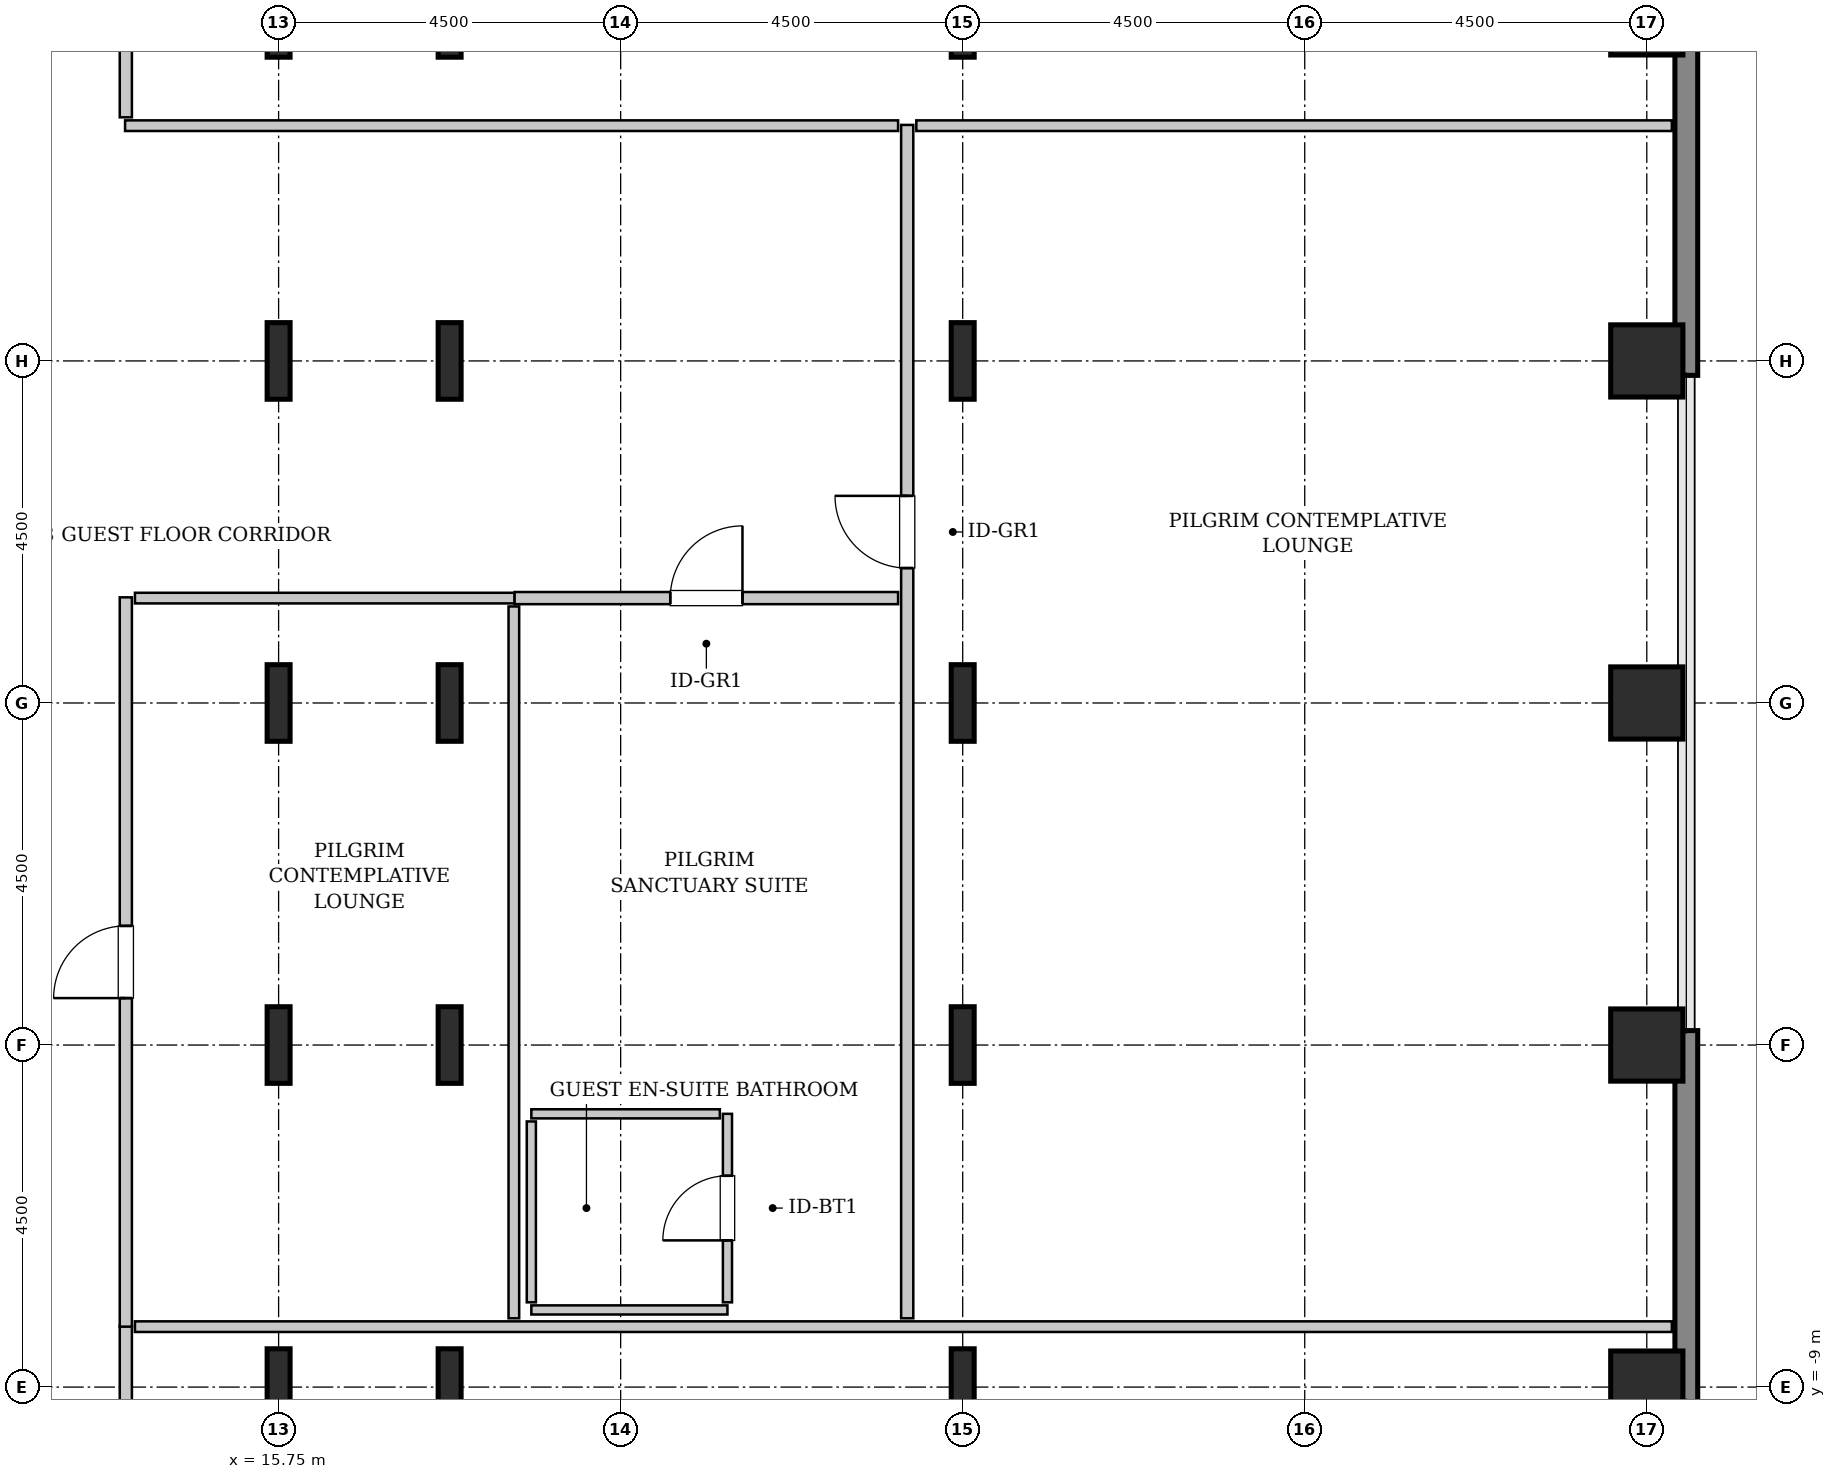
"""IFC4 building model, lengths in metres.
Left out: names, types, materials, properties, quantities, classifications, styles, units other than length and angle.
Written with IfcOpenShell. Run it as: python <this file> out.ifc"""

import sys

from ifc_helpers import new_model, si_unit, direction, frame, frame_2d, origin, origin_2d, place, context, subcontext, project, spatial, rectangle, hollow_rectangle, i_section, extrude, source, transform, mapped, element, fill, save


model = new_model("IFC4")
c1 = context("Model", 3, precision=1e-05, world=origin(), true_north=direction((0.0, 1.0)))
c2 = subcontext(c1, "Body", "Model", "MODEL_VIEW")
j1 = project(units=[si_unit("LENGTHUNIT", "METRE"), si_unit("PLANEANGLEUNIT", "RADIAN")], contexts=[c1])
p1 = place(None, origin())
s1 = spatial("IfcSite", under=j1, at=p1, CompositionType="ELEMENT")
p2 = place(p1, origin())
s2 = spatial("IfcBuilding", under=s1, at=p2, CompositionType="ELEMENT")
p3 = place(p2, frame((0.0, 0.0, 78.6)))
s3 = spatial("IfcBuildingStorey", under=s2, at=p3, CompositionType="ELEMENT", Elevation=78.6)
m1 = source(origin(), c2, "Body", "SweptSolid", [
    extrude(i_section(OverallWidth=0.302, OverallDepth=1.008, WebThickness=0.021, FlangeThickness=0.04, FilletRadius=0.03, at=origin_2d()), origin(), (0.0, 0.0, 1.0), 3.8),
])
for number, where, z_axis, x_axis in (
    (1, (15.75, -9.0, 0.0), (0.0, 0.0, 1.0), (1.0, 0.0, 0.0)),
    (2, (15.75, -4.5, 0.0), (0.0, 0.0, 1.0), (1.0, 0.0, 0.0)),
    (3, (15.75, 0.0, 0.0), (0.0, 0.0, 1.0), (1.0, 0.0, 0.0)),
    (4, (15.75, 4.5, 0.0), (0.0, 0.0, 1.0), (1.0, 0.0, 0.0)),
    (5, (15.75, 9.0, 0.0), (0.0, 0.0, 1.0), (1.0, 0.0, 0.0)),
    (6, (18.0, -9.0, 0.0), (0.0, 0.0, 1.0), (1.0, 0.0, 0.0)),
    (7, (18.0, -4.5, 0.0), (0.0, 0.0, 1.0), (1.0, 0.0, 0.0)),
    (8, (18.0, 0.0, 0.0), (0.0, 0.0, 1.0), (1.0, 0.0, 0.0)),
    (9, (18.0, 4.5, 0.0), (0.0, 0.0, 1.0), (1.0, 0.0, 0.0)),
    (10, (18.0, 9.0, 0.0), (0.0, 0.0, 1.0), (1.0, 0.0, 0.0)),
    (11, (24.75, -9.0, 0.0), (0.0, 0.0, 1.0), (1.0, 0.0, 0.0)),
    (12, (24.75, -4.5, 0.0), (0.0, 0.0, 1.0), (1.0, 0.0, 0.0)),
    (13, (24.75, 0.0, 0.0), (0.0, 0.0, 1.0), (1.0, 0.0, 0.0)),
    (14, (24.75, 4.5, 0.0), (0.0, 0.0, 1.0), (1.0, 0.0, 0.0)),
    (15, (24.75, 9.0, 0.0), (0.0, 0.0, 1.0), (1.0, 0.0, 0.0)),
):
    element("IfcColumn", number, at=place(p3, frame(where, z_axis=z_axis, x_axis=x_axis)), inside=s3, PredefinedType="COLUMN", context=c2, shape_type="MappedRepresentation", body=[
        mapped(m1, transform((0.0, 0.0, 0.0), x_axis=(1.0, 0.0, 0.0), y_axis=(0.0, 1.0, 0.0), z_axis=(0.0, 0.0, 1.0), scale=1.0)),
    ])
m2 = source(origin(), c2, "Body", "SweptSolid", [
    extrude(hollow_rectangle(XDim=0.95, YDim=0.95, WallThickness=0.045, InnerFilletRadius=0.045, OuterFilletRadius=0.09, at=origin_2d()), origin(), (0.0, 0.0, 1.0), 3.8),
])
for number, where, z_axis, x_axis in (
    (16, (33.75, -9.0, 0.0), (0.0, 0.0, 1.0), (1.0, 0.0, 0.0)),
    (17, (33.75, -4.5, 0.0), (0.0, 0.0, 1.0), (1.0, 0.0, 0.0)),
    (18, (33.75, 0.0, 0.0), (0.0, 0.0, 1.0), (1.0, 0.0, 0.0)),
    (19, (33.75, 4.5, 0.0), (0.0, 0.0, 1.0), (1.0, 0.0, 0.0)),
    (20, (33.75, 9.0, 0.0), (0.0, 0.0, 1.0), (1.0, 0.0, 0.0)),
):
    element("IfcColumn", number, at=place(p3, frame(where, z_axis=z_axis, x_axis=x_axis)), inside=s3, PredefinedType="COLUMN", context=c2, shape_type="MappedRepresentation", body=[
        mapped(m2, transform((0.0, 0.0, 0.0), x_axis=(1.0, 0.0, 0.0), y_axis=(0.0, 1.0, 0.0), z_axis=(0.0, 0.0, 1.0), scale=1.0)),
    ])
m3 = source(origin(), c2, "Body", "SweptSolid", [
    extrude(rectangle(XDim=4.88, YDim=0.3, at=frame_2d((2.44, 0.0))), origin(), (0.0, 0.0, 1.0), 3.55),
])
for number, where, z_axis, x_axis in (
    (21, (34.27, -9.19, 0.0), (0.0, 0.0, 1.0), (0.0, 1.0, 0.0)),
    (22, (34.27, 4.31, 0.0), (0.0, 0.0, 1.0), (0.0, 1.0, 0.0)),
):
    element("IfcWall", number, at=place(p3, frame(where, z_axis=z_axis, x_axis=x_axis)), inside=s3, PredefinedType="SHEAR", context=c2, shape_type="MappedRepresentation", body=[
        mapped(m3, transform((0.0, 0.0, 0.0), x_axis=(1.0, 0.0, 0.0), y_axis=(0.0, 1.0, 0.0), z_axis=(0.0, 0.0, 1.0), scale=1.0)),
    ])
m4 = source(origin(), c2, "Body", "SweptSolid", [
    extrude(rectangle(XDim=2.58, YDim=0.12, at=frame_2d((1.29, 0.0))), origin(), (0.0, 0.0, 1.0), 3.535),
])
p4 = place(p3, frame((19.075, -7.985, 0.0), z_axis=(0.0, 0.0, 1.0), x_axis=(1.0, 0.0, 0.0)))
e23 = element("IfcWall", 23, at=p4, inside=s3, PredefinedType="PLUMBINGWALL", context=c2, shape_type="MappedRepresentation", body=[
    mapped(m4, transform((0.0, 0.0, 0.0), x_axis=(1.0, 0.0, 0.0), y_axis=(0.0, 1.0, 0.0), z_axis=(0.0, 0.0, 1.0), scale=1.0)),
])
m5 = source(origin(), c2, "Body", "SweptSolid", [
    extrude(rectangle(XDim=2.48, YDim=0.12, at=frame_2d((1.24, 0.0))), origin(), (0.0, 0.0, 1.0), 3.535),
])
p5 = place(p3, frame((21.655, -7.885, 0.0), z_axis=(0.0, 0.0, 1.0), x_axis=(0.0, 1.0, 0.0)))
e24 = element("IfcWall", 24, at=p5, inside=s3, PredefinedType="PLUMBINGWALL", context=c2, shape_type="MappedRepresentation", body=[
    mapped(m5, transform((0.0, 0.0, 0.0), x_axis=(1.0, 0.0, 0.0), y_axis=(0.0, 1.0, 0.0), z_axis=(0.0, 0.0, 1.0), scale=1.0)),
])
p6 = place(p5, frame((0.815, 0.0, 0.0)))
e25 = element("IfcOpeningElement", 25, at=p6, cuts=e24, PredefinedType="OPENING", context=c2, shape_type="SweptSolid", body=[
    extrude(rectangle(XDim=0.85, YDim=2.1, at=frame_2d((0.425, 1.05))), frame((0.0, 0.07, 0.0), z_axis=(0.0, -1.0, 0.0), x_axis=(1.0, 0.0, 0.0)), (0.0, 0.0, 1.0), 0.14),
])
p7 = place(p3, frame((19.075, -5.405, 0.0), z_axis=(0.0, 0.0, 1.0), x_axis=(1.0, 0.0, 0.0)))
e26 = element("IfcWall", 26, at=p7, inside=s3, PredefinedType="PLUMBINGWALL", context=c2, shape_type="MappedRepresentation", body=[
    mapped(m5, transform((0.0, 0.0, 0.0), x_axis=(1.0, 0.0, 0.0), y_axis=(0.0, 1.0, 0.0), z_axis=(0.0, 0.0, 1.0), scale=1.0)),
])
m6 = source(origin(), c2, "Body", "SweptSolid", [
    extrude(rectangle(XDim=2.38, YDim=0.12, at=frame_2d((1.19, 0.0))), origin(), (0.0, 0.0, 1.0), 3.535),
])
p8 = place(p3, frame((19.075, -7.885, 0.0), z_axis=(0.0, 0.0, 1.0), x_axis=(0.0, 1.0, 0.0)))
e27 = element("IfcWall", 27, at=p8, inside=s3, PredefinedType="PLUMBINGWALL", context=c2, shape_type="MappedRepresentation", body=[
    mapped(m6, transform((0.0, 0.0, 0.0), x_axis=(1.0, 0.0, 0.0), y_axis=(0.0, 1.0, 0.0), z_axis=(0.0, 0.0, 1.0), scale=1.0)),
])
m7 = source(origin(), c2, "Body", "SweptSolid", [
    extrude(rectangle(XDim=14.845, YDim=0.16, at=frame_2d((7.422, 0.0))), origin(), (0.0, 0.0, 1.0), 3.535),
])
p9 = place(p3, frame((13.74, -23.04, 0.0), z_axis=(0.0, 0.0, 1.0), x_axis=(0.0, 1.0, 0.0)))
e28 = element("IfcWall", 28, at=p9, inside=s3, PredefinedType="PARTITIONING", context=c2, shape_type="MappedRepresentation", body=[
    mapped(m7, transform((0.0, 0.0, 0.0), x_axis=(1.0, 0.0, 0.0), y_axis=(0.0, 1.0, 0.0), z_axis=(0.0, 0.0, 1.0), scale=1.0)),
])
p10 = place(p9, frame((12.712, 0.0, 0.0)))
e29 = element("IfcOpeningElement", 29, at=p10, cuts=e28, PredefinedType="OPENING", context=c2, shape_type="SweptSolid", body=[
    extrude(rectangle(XDim=0.95, YDim=2.1, at=frame_2d((0.475, 1.05))), frame((0.0, 0.09, 0.0), z_axis=(0.0, -1.0, 0.0), x_axis=(1.0, 0.0, 0.0)), (0.0, 0.0, 1.0), 0.18),
])
m8 = source(origin(), c2, "Body", "SweptSolid", [
    extrude(rectangle(XDim=20.22, YDim=0.14, at=frame_2d((10.11, 0.0))), origin(), (0.0, 0.0, 1.0), 3.535),
])
p11 = place(p3, frame((13.86, -8.205, 0.0), z_axis=(0.0, 0.0, 1.0), x_axis=(1.0, 0.0, 0.0)))
e30 = element("IfcWall", 30, at=p11, inside=s3, PredefinedType="PARTITIONING", context=c2, shape_type="MappedRepresentation", body=[
    mapped(m8, transform((0.0, 0.0, 0.0), x_axis=(1.0, 0.0, 0.0), y_axis=(0.0, 1.0, 0.0), z_axis=(0.0, 0.0, 1.0), scale=1.0)),
])
m9 = source(origin(), c2, "Body", "SweptSolid", [
    extrude(rectangle(XDim=15.7, YDim=0.16, at=frame_2d((7.85, 0.0))), origin(), (0.0, 0.0, 1.0), 3.535),
])
p12 = place(p3, frame((24.02, -8.095, 0.0), z_axis=(0.0, 0.0, 1.0), x_axis=(0.0, 1.0, 0.0)))
e31 = element("IfcWall", 31, at=p12, inside=s3, PredefinedType="PARTITIONING", context=c2, shape_type="MappedRepresentation", body=[
    mapped(m9, transform((0.0, 0.0, 0.0), x_axis=(1.0, 0.0, 0.0), y_axis=(0.0, 1.0, 0.0), z_axis=(0.0, 0.0, 1.0), scale=1.0)),
])
p13 = place(p12, frame((9.87, 0.0, 0.0)))
e32 = element("IfcOpeningElement", 32, at=p13, cuts=e31, PredefinedType="OPENING", context=c2, shape_type="SweptSolid", body=[
    extrude(rectangle(XDim=0.95, YDim=2.1, at=frame_2d((0.475, 1.05))), frame((0.0, 0.09, 0.0), z_axis=(0.0, -1.0, 0.0), x_axis=(1.0, 0.0, 0.0)), (0.0, 0.0, 1.0), 0.18),
])
m10 = source(origin(), c2, "Body", "SweptSolid", [
    extrude(rectangle(XDim=10.17, YDim=0.14, at=frame_2d((5.085, 0.0))), origin(), (0.0, 0.0, 1.0), 3.535),
])
p14 = place(p3, frame((13.73, 7.595, 0.0), z_axis=(0.0, 0.0, 1.0), x_axis=(1.0, 0.0, 0.0)))
e33 = element("IfcWall", 33, at=p14, inside=s3, PredefinedType="PARTITIONING", context=c2, shape_type="MappedRepresentation", body=[
    mapped(m10, transform((0.0, 0.0, 0.0), x_axis=(1.0, 0.0, 0.0), y_axis=(0.0, 1.0, 0.0), z_axis=(0.0, 0.0, 1.0), scale=1.0)),
])
m11 = source(origin(), c2, "Body", "SweptSolid", [
    extrude(rectangle(XDim=9.94, YDim=0.14, at=frame_2d((4.97, 0.0))), origin(), (0.0, 0.0, 1.0), 3.535),
])
p15 = place(p3, frame((24.14, 7.595, 0.0), z_axis=(0.0, 0.0, 1.0), x_axis=(1.0, 0.0, 0.0)))
e34 = element("IfcWall", 34, at=p15, inside=s3, PredefinedType="PARTITIONING", context=c2, shape_type="MappedRepresentation", body=[
    mapped(m11, transform((0.0, 0.0, 0.0), x_axis=(1.0, 0.0, 0.0), y_axis=(0.0, 1.0, 0.0), z_axis=(0.0, 0.0, 1.0), scale=1.0)),
])
m12 = source(origin(), c2, "Body", "SweptSolid", [
    extrude(rectangle(XDim=9.595, YDim=0.16, at=frame_2d((4.797, 0.0))), origin(), (0.0, 0.0, 1.0), 3.535),
])
p16 = place(p3, frame((13.74, -8.205, 0.0), z_axis=(0.0, 0.0, 1.0), x_axis=(0.0, 1.0, 0.0)))
e35 = element("IfcWall", 35, at=p16, inside=s3, PredefinedType="PARTITIONING", context=c2, shape_type="MappedRepresentation", body=[
    mapped(m12, transform((0.0, 0.0, 0.0), x_axis=(1.0, 0.0, 0.0), y_axis=(0.0, 1.0, 0.0), z_axis=(0.0, 0.0, 1.0), scale=1.0)),
])
p17 = place(p16, frame((4.323, 0.0, 0.0)))
e36 = element("IfcOpeningElement", 36, at=p17, cuts=e35, PredefinedType="OPENING", context=c2, shape_type="SweptSolid", body=[
    extrude(rectangle(XDim=0.95, YDim=2.1, at=frame_2d((0.475, 1.05))), frame((0.0, 0.09, 0.0), z_axis=(0.0, -1.0, 0.0), x_axis=(1.0, 0.0, 0.0)), (0.0, 0.0, 1.0), 0.18),
])
m13 = source(origin(), c2, "Body", "SweptSolid", [
    extrude(rectangle(XDim=4.995, YDim=0.14, at=frame_2d((2.498, 0.0))), origin(), (0.0, 0.0, 1.0), 3.535),
])
p18 = place(p3, frame((13.86, 1.38, 0.0), z_axis=(0.0, 0.0, 1.0), x_axis=(1.0, 0.0, 0.0)))
e37 = element("IfcWall", 37, at=p18, inside=s3, PredefinedType="PARTITIONING", context=c2, shape_type="MappedRepresentation", body=[
    mapped(m13, transform((0.0, 0.0, 0.0), x_axis=(1.0, 0.0, 0.0), y_axis=(0.0, 1.0, 0.0), z_axis=(0.0, 0.0, 1.0), scale=1.0)),
])
m14 = source(origin(), c2, "Body", "SweptSolid", [
    extrude(rectangle(XDim=9.365, YDim=0.14, at=frame_2d((4.683, 0.0))), origin(), (0.0, 0.0, 1.0), 3.535),
])
p19 = place(p3, frame((18.845, -8.095, 0.0), z_axis=(0.0, 0.0, 1.0), x_axis=(0.0, 1.0, 0.0)))
e38 = element("IfcWall", 38, at=p19, inside=s3, PredefinedType="PARTITIONING", context=c2, shape_type="MappedRepresentation", body=[
    mapped(m14, transform((0.0, 0.0, 0.0), x_axis=(1.0, 0.0, 0.0), y_axis=(0.0, 1.0, 0.0), z_axis=(0.0, 0.0, 1.0), scale=1.0)),
])
m15 = source(origin(), c2, "Body", "SweptSolid", [
    extrude(rectangle(XDim=5.045, YDim=0.16, at=frame_2d((2.522, 0.0))), origin(), (0.0, 0.0, 1.0), 3.535),
])
p20 = place(p3, frame((18.855, 1.38, 0.0), z_axis=(0.0, 0.0, 1.0), x_axis=(1.0, 0.0, 0.0)))
e39 = element("IfcWall", 39, at=p20, inside=s3, PredefinedType="PARTITIONING", context=c2, shape_type="MappedRepresentation", body=[
    mapped(m15, transform((0.0, 0.0, 0.0), x_axis=(1.0, 0.0, 0.0), y_axis=(0.0, 1.0, 0.0), z_axis=(0.0, 0.0, 1.0), scale=1.0)),
])
p21 = place(p20, frame((2.048, 0.0, 0.0)))
e40 = element("IfcOpeningElement", 40, at=p21, cuts=e39, PredefinedType="OPENING", context=c2, shape_type="SweptSolid", body=[
    extrude(rectangle(XDim=0.95, YDim=2.1, at=frame_2d((0.475, 1.05))), frame((0.0, 0.09, 0.0), z_axis=(0.0, -1.0, 0.0), x_axis=(1.0, 0.0, 0.0)), (0.0, 0.0, 1.0), 0.18),
])
m16 = source(origin(), c2, "Body", "SweptSolid", [
    extrude(rectangle(XDim=15.335, YDim=0.16, at=frame_2d((7.667, 0.0))), origin(), (0.0, 0.0, 1.0), 3.535),
])
p22 = place(p3, frame((13.74, 7.705, 0.0), z_axis=(0.0, 0.0, 1.0), x_axis=(0.0, 1.0, 0.0)))
e41 = element("IfcWall", 41, at=p22, inside=s3, PredefinedType="PARTITIONING", context=c2, shape_type="MappedRepresentation", body=[
    mapped(m16, transform((0.0, 0.0, 0.0), x_axis=(1.0, 0.0, 0.0), y_axis=(0.0, 1.0, 0.0), z_axis=(0.0, 0.0, 1.0), scale=1.0)),
])
p23 = place(p22, frame((1.427, 0.0, 0.0)))
e42 = element("IfcOpeningElement", 42, at=p23, cuts=e41, PredefinedType="OPENING", context=c2, shape_type="SweptSolid", body=[
    extrude(rectangle(XDim=0.95, YDim=2.1, at=frame_2d((0.475, 1.05))), frame((0.0, 0.09, 0.0), z_axis=(0.0, -1.0, 0.0), x_axis=(1.0, 0.0, 0.0)), (0.0, 0.0, 1.0), 0.18),
])
m17 = source(origin(), c2, "Body", "SweptSolid", [
    extrude(rectangle(XDim=0.85, YDim=2.1, at=frame_2d((0.425, 1.05))), frame((0.0, 0.025, 0.0), z_axis=(0.0, -1.0, 0.0), x_axis=(1.0, 0.0, 0.0)), (0.0, 0.0, 1.0), 0.05),
])
p24 = place(p6, origin())
e43 = element("IfcDoor", 43, at=p24, inside=s3, OperationType="SINGLE_SWING_LEFT", PredefinedType="DOOR", context=c2, shape_type="MappedRepresentation", body=[
    mapped(m17, transform((0.0, 0.0, 0.0), x_axis=(1.0, 0.0, 0.0), y_axis=(0.0, 1.0, 0.0), z_axis=(0.0, 0.0, 1.0), scale=1.0)),
])
fill(e25, e43)
m18 = source(origin(), c2, "Body", "SweptSolid", [
    extrude(rectangle(XDim=0.95, YDim=2.1, at=frame_2d((0.475, 1.05))), frame((0.0, 0.025, 0.0), z_axis=(0.0, -1.0, 0.0), x_axis=(1.0, 0.0, 0.0)), (0.0, 0.0, 1.0), 0.05),
])
p25 = place(p13, origin())
e44 = element("IfcDoor", 44, at=p25, inside=s3, OperationType="SINGLE_SWING_RIGHT", PredefinedType="DOOR", context=c2, shape_type="MappedRepresentation", body=[
    mapped(m18, transform((0.0, 0.0, 0.0), x_axis=(1.0, 0.0, 0.0), y_axis=(0.0, 1.0, 0.0), z_axis=(0.0, 0.0, 1.0), scale=1.0)),
])
fill(e32, e44)
p26 = place(p17, origin())
e45 = element("IfcDoor", 45, at=p26, inside=s3, OperationType="SINGLE_SWING_LEFT", PredefinedType="DOOR", context=c2, shape_type="MappedRepresentation", body=[
    mapped(m18, transform((0.0, 0.0, 0.0), x_axis=(1.0, 0.0, 0.0), y_axis=(0.0, 1.0, 0.0), z_axis=(0.0, 0.0, 1.0), scale=1.0)),
])
fill(e36, e45)
p27 = place(p21, origin())
e46 = element("IfcDoor", 46, at=p27, inside=s3, OperationType="SINGLE_SWING_RIGHT", PredefinedType="DOOR", context=c2, shape_type="MappedRepresentation", body=[
    mapped(m18, transform((0.0, 0.0, 0.0), x_axis=(1.0, 0.0, 0.0), y_axis=(0.0, 1.0, 0.0), z_axis=(0.0, 0.0, 1.0), scale=1.0)),
])
fill(e40, e46)
save(model, sys.argv[1])
